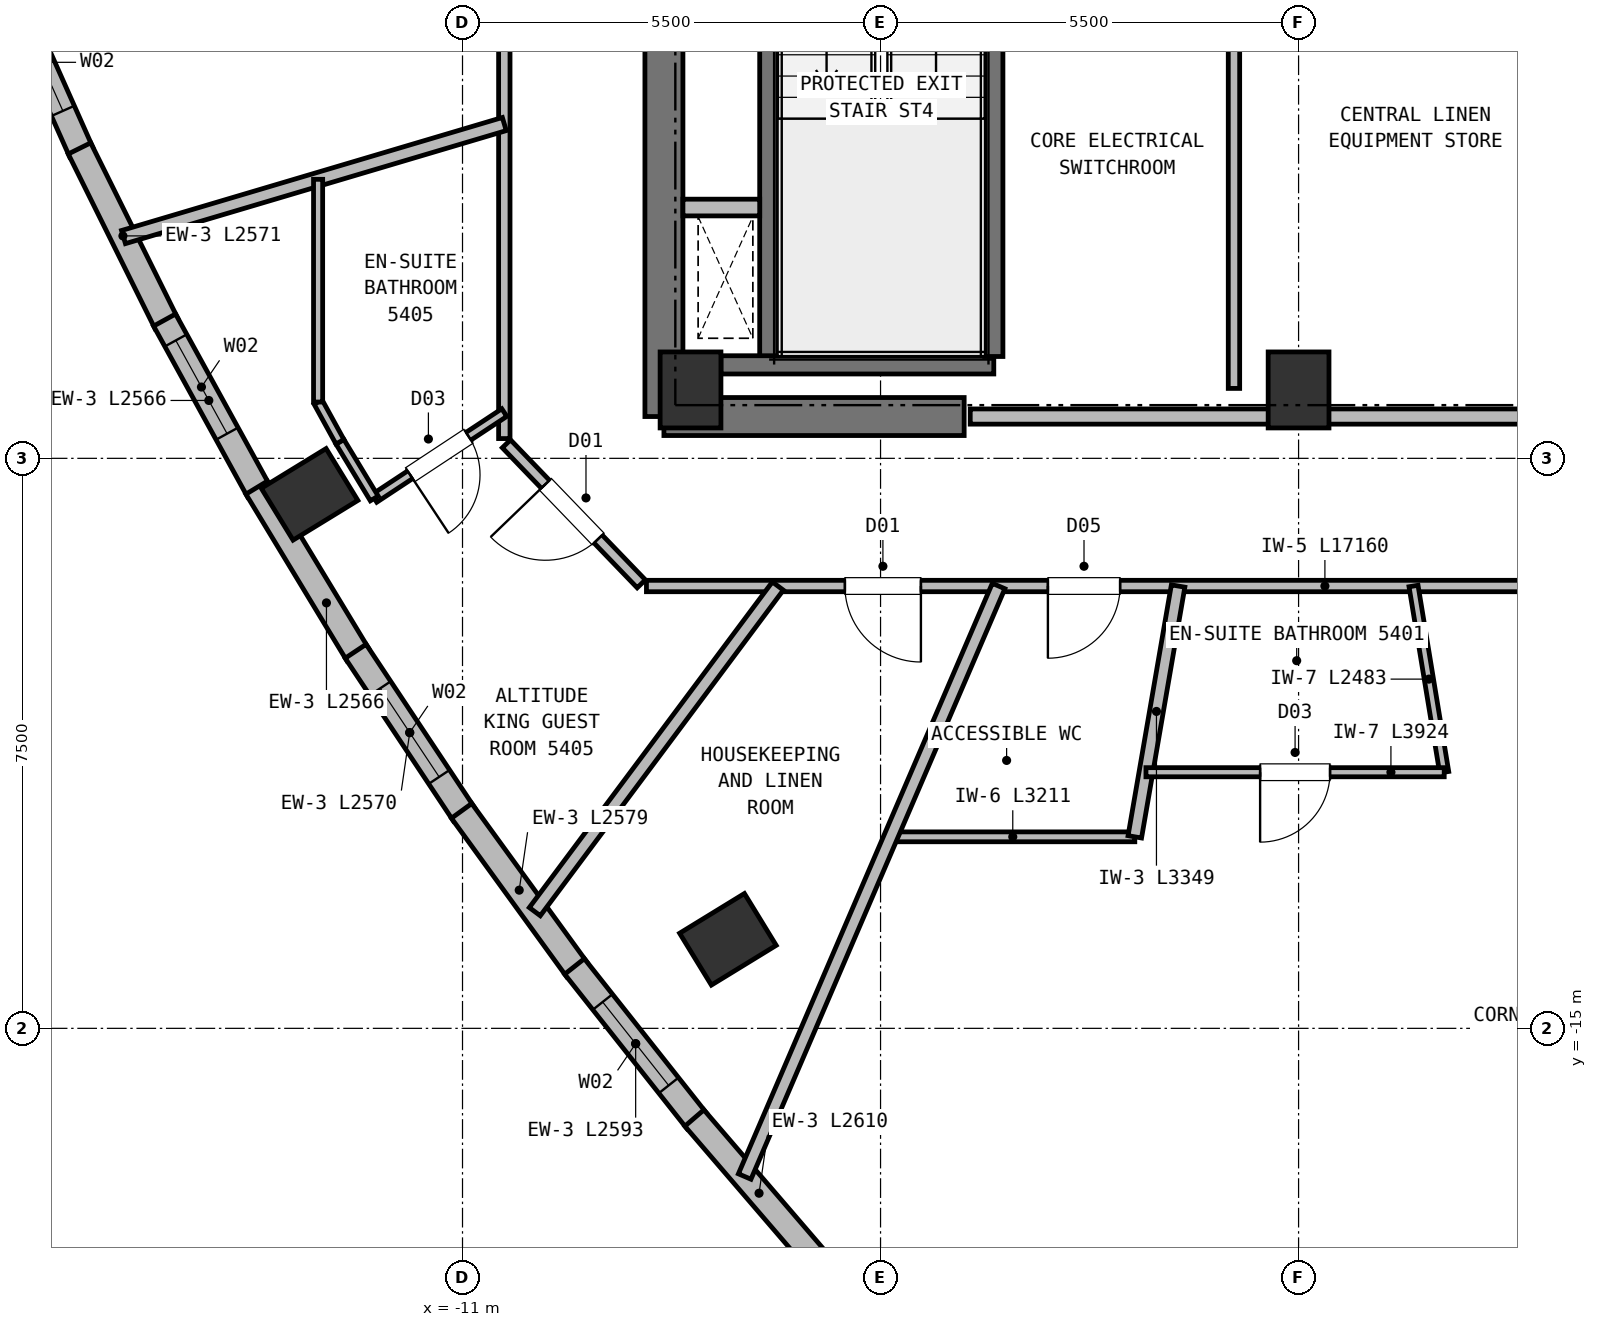
"""IFC4 building model, lengths in metres.
Left out: names, types, materials, properties, quantities, classifications, styles, units other than length and angle.
Written with IfcOpenShell. Run it as: python <this file> out.ifc"""

import sys

from ifc_helpers import new_model, si_unit, direction, frame, frame_2d, origin, origin_2d, place, context, subcontext, project, spatial, rectangle, extrude, element, fill, save


model = new_model("IFC4")
c1 = context("Model", 3, precision=1e-05, world=origin(), true_north=direction((0.0, 1.0)))
c2 = subcontext(c1, "Body", "Model", "MODEL_VIEW")
j1 = project(units=[si_unit("LENGTHUNIT", "METRE"), si_unit("PLANEANGLEUNIT", "RADIAN")], contexts=[c1])
p1 = place(None, origin())
s1 = spatial("IfcSite", under=j1, at=p1, CompositionType="ELEMENT")
p2 = place(p1, origin())
s2 = spatial("IfcBuilding", under=s1, at=p2, CompositionType="ELEMENT")
p3 = place(p2, frame((0.0, 0.0, 205.55)))
s3 = spatial("IfcBuildingStorey", under=s2, at=p3, CompositionType="ELEMENT", Elevation=205.55)
for number, where, z_axis, x_axis in (
    (1, (-8.0, -6.6, 0.0), (0.0, 0.0, 1.0), (1.0, 0.0, 0.0)),
    (2, (0.0, -6.6, 0.0), (0.0, 0.0, 1.0), (1.0, 0.0, 0.0)),
):
    element("IfcColumn", number, at=place(p3, frame(where, z_axis=z_axis, x_axis=x_axis)), inside=s3, PredefinedType="COLUMN", context=c2, shape_type="SweptSolid", body=[
        extrude(rectangle(XDim=0.8, YDim=1.0, at=origin_2d()), origin(), (0.0, 0.0, 1.0), 3.8),
    ])
p4 = place(p3, frame((-8.35, -6.95, 0.0), z_axis=(0.0, 0.0, 1.0), x_axis=(1.0, 0.0, 0.0)))
e3 = element("IfcWall", 3, at=p4, inside=s3, PredefinedType="SHEAR", context=c2, shape_type="SweptSolid", body=[
    extrude(rectangle(XDim=3.95, YDim=0.5, at=frame_2d((1.975, 0.0))), origin(), (0.0, 0.0, 1.0), 3.55),
])
p5 = place(p3, frame((-8.35, -6.95, 0.0), z_axis=(0.0, 0.0, 1.0), x_axis=(0.0, 1.0, 0.0)))
e4 = element("IfcWall", 4, at=p5, inside=s3, PredefinedType="SHEAR", context=c2, shape_type="SweptSolid", body=[
    extrude(rectangle(XDim=8.1, YDim=0.5, at=frame_2d((4.05, 0.0))), origin(), (0.0, 0.0, 1.0), 3.55),
])
for number, where, z_axis, x_axis in (
    (5, (-13.012, -7.974, 0.0), (0.0, 0.0, 1.0), (-0.522, 0.853, 0.0)),
    (6, (-7.508, -13.828, 0.0), (0.0, 0.0, 1.0), (-0.522, 0.853, 0.0)),
):
    element("IfcColumn", number, at=place(p3, frame(where, z_axis=z_axis, x_axis=x_axis)), inside=s3, PredefinedType="COLUMN", context=c2, shape_type="SweptSolid", body=[
        extrude(rectangle(XDim=0.8, YDim=1.0, at=origin_2d()), origin(), (0.0, 0.0, 1.0), 3.8),
    ])
p6 = place(p3, frame((-16.018, -3.467, 0.0), z_axis=(0.0, 0.0, 1.0), x_axis=(-0.40690235828, 0.913471658469, 0.0)))
e7 = element("IfcWall", 7, at=p6, inside=s3, PredefinedType="SOLIDWALL", context=c2, shape_type="SweptSolid", body=[
    extrude(rectangle(XDim=2.579, YDim=0.33, at=frame_2d((1.29, 0.0))), origin(), (0.0, 0.0, 1.0), 3.55),
])
p7 = place(p6, frame((0.59, 0.0, 0.72)))
e8 = element("IfcOpeningElement", 8, at=p7, cuts=e7, PredefinedType="OPENING", context=c2, shape_type="SweptSolid", body=[
    extrude(rectangle(XDim=1.4, YDim=1.84, at=frame_2d((0.7, 0.92))), frame((0.0, 0.175, 0.0), z_axis=(0.0, -1.0, 0.0), x_axis=(1.0, 0.0, 0.0)), (0.0, 0.0, 1.0), 0.35),
])
p8 = place(p3, frame((-14.896, -5.725, 0.0), z_axis=(0.0, 0.0, 1.0), x_axis=(-0.444590292188, 0.895734040936, 0.0)))
e9 = element("IfcWall", 9, at=p8, inside=s3, PredefinedType="SOLIDWALL", context=c2, shape_type="SweptSolid", body=[
    extrude(rectangle(XDim=2.571, YDim=0.33, at=frame_2d((1.285, 0.0))), origin(), (0.0, 0.0, 1.0), 3.55),
])
p9 = place(p3, frame((-13.683, -7.929, 0.0), z_axis=(0.0, 0.0, 1.0), x_axis=(-0.481695948565, 0.87633841245, 0.0)))
e10 = element("IfcWall", 10, at=p9, inside=s3, PredefinedType="SOLIDWALL", context=c2, shape_type="SweptSolid", body=[
    extrude(rectangle(XDim=2.566, YDim=0.33, at=frame_2d((1.283, 0.0))), origin(), (0.0, 0.0, 1.0), 3.55),
])
p10 = place(p9, frame((0.86, 0.0, 0.72)))
e11 = element("IfcOpeningElement", 11, at=p10, cuts=e10, PredefinedType="OPENING", context=c2, shape_type="SweptSolid", body=[
    extrude(rectangle(XDim=1.4, YDim=1.84, at=frame_2d((0.7, 0.92))), frame((0.0, 0.175, 0.0), z_axis=(0.0, -1.0, 0.0), x_axis=(1.0, 0.0, 0.0)), (0.0, 0.0, 1.0), 0.35),
])
p11 = place(p3, frame((-12.379, -10.081, 0.0), z_axis=(0.0, 0.0, 1.0), x_axis=(-0.518128806216, 0.855302601521, 0.0)))
e12 = element("IfcWall", 12, at=p11, inside=s3, PredefinedType="SOLIDWALL", context=c2, shape_type="SweptSolid", body=[
    extrude(rectangle(XDim=2.566, YDim=0.33, at=frame_2d((1.283, 0.0))), origin(), (0.0, 0.0, 1.0), 3.55),
])
p12 = place(p3, frame((-10.983, -12.179, 0.0), z_axis=(0.0, 0.0, 1.0), x_axis=(-0.553340543582, 0.832955126539, 0.0)))
e13 = element("IfcWall", 13, at=p12, inside=s3, PredefinedType="SOLIDWALL", context=c2, shape_type="SweptSolid", body=[
    extrude(rectangle(XDim=2.571, YDim=0.33, at=frame_2d((1.285, 0.0))), origin(), (0.0, 0.0, 1.0), 3.55),
])
p13 = place(p12, frame((0.585, 0.0, 0.72)))
e14 = element("IfcOpeningElement", 14, at=p13, cuts=e13, PredefinedType="OPENING", context=c2, shape_type="SweptSolid", body=[
    extrude(rectangle(XDim=1.4, YDim=1.84, at=frame_2d((0.7, 0.92))), frame((0.0, 0.175, 0.0), z_axis=(0.0, -1.0, 0.0), x_axis=(1.0, 0.0, 0.0)), (0.0, 0.0, 1.0), 0.35),
])
p14 = place(p3, frame((-9.496, -14.225, 0.0), z_axis=(0.0, 0.0, 1.0), x_axis=(-0.587631253471, 0.809128858677, 0.0)))
e15 = element("IfcWall", 15, at=p14, inside=s3, PredefinedType="SOLIDWALL", context=c2, shape_type="SweptSolid", body=[
    extrude(rectangle(XDim=2.579, YDim=0.33, at=frame_2d((1.29, 0.0))), origin(), (0.0, 0.0, 1.0), 3.55),
])
p15 = place(p3, frame((-7.917, -16.219, 0.0), z_axis=(0.0, 0.0, 1.0), x_axis=(-0.62057509915, 0.784147018304, 0.0)))
e16 = element("IfcWall", 16, at=p15, inside=s3, PredefinedType="SOLIDWALL", context=c2, shape_type="SweptSolid", body=[
    extrude(rectangle(XDim=2.593, YDim=0.33, at=frame_2d((1.296, 0.0))), origin(), (0.0, 0.0, 1.0), 3.55),
])
p16 = place(p15, frame((0.596, 0.0, 0.72)))
e17 = element("IfcOpeningElement", 17, at=p16, cuts=e16, PredefinedType="OPENING", context=c2, shape_type="SweptSolid", body=[
    extrude(rectangle(XDim=1.4, YDim=1.84, at=frame_2d((0.7, 0.92))), frame((0.0, 0.175, 0.0), z_axis=(0.0, -1.0, 0.0), x_axis=(1.0, 0.0, 0.0)), (0.0, 0.0, 1.0), 0.35),
])
p17 = place(p3, frame((-6.248, -18.159, 0.0), z_axis=(0.0, 0.0, 1.0), x_axis=(-0.651976891987, 0.758238835932, 0.0)))
e18 = element("IfcWall", 18, at=p17, inside=s3, PredefinedType="SOLIDWALL", context=c2, shape_type="SweptSolid", body=[
    extrude(rectangle(XDim=2.61, YDim=0.33, at=frame_2d((1.305, 0.0))), origin(), (0.0, 0.0, 1.0), 3.55),
])
p18 = place(p3, frame((-6.97, -6.16, 0.0), z_axis=(0.0, 0.0, 1.0), x_axis=(0.0, 1.0, 0.0)))
e19 = element("IfcWall", 19, at=p18, inside=s3, PredefinedType="SHEAR", context=c2, shape_type="SweptSolid", body=[
    extrude(rectangle(XDim=7.22, YDim=0.24, at=frame_2d((3.61, 0.0))), origin(), (0.0, 0.0, 1.0), 3.55),
])
p19 = place(p3, frame((-7.6, -6.27, 0.0), z_axis=(0.0, 0.0, 1.0), x_axis=(1.0, 0.0, 0.0)))
e20 = element("IfcWall", 20, at=p19, inside=s3, PredefinedType="SHEAR", context=c2, shape_type="SweptSolid", body=[
    extrude(rectangle(XDim=3.59, YDim=0.24, at=frame_2d((1.795, 0.0))), origin(), (0.0, 0.0, 1.0), 3.55),
])
p20 = place(p3, frame((-4.01, -6.16, 0.0), z_axis=(0.0, 0.0, 1.0), x_axis=(0.0, 1.0, 0.0)))
e21 = element("IfcWall", 21, at=p20, inside=s3, PredefinedType="SHEAR", context=c2, shape_type="SweptSolid", body=[
    extrude(rectangle(XDim=7.22, YDim=0.24, at=frame_2d((3.61, 0.0))), origin(), (0.0, 0.0, 1.0), 3.55),
])
p21 = place(p3, frame((-8.1, -4.2, 0.0), z_axis=(0.0, 0.0, 1.0), x_axis=(1.0, 0.0, 0.0)))
e22 = element("IfcWall", 22, at=p21, inside=s3, PredefinedType="PARTITIONING", context=c2, shape_type="SweptSolid", body=[
    extrude(rectangle(XDim=1.01, YDim=0.22, at=frame_2d((0.505, 0.0))), origin(), (0.0, 0.0, 1.0), 3.55),
])
p22 = place(p3, frame((-4.32, -6.95, 0.0), z_axis=(0.0, 0.0, 1.0), x_axis=(1.0, 0.0, 0.0)))
e23 = element("IfcWall", 23, at=p22, inside=s3, PredefinedType="PARTITIONING", context=c2, shape_type="SweptSolid", body=[
    extrude(rectangle(XDim=8.64, YDim=0.2, at=frame_2d((4.32, 0.0))), origin(), (0.0, 0.0, 1.0), 3.55),
])
p23 = place(p3, frame((-0.85, -6.58, 0.0), z_axis=(0.0, 0.0, 1.0), x_axis=(0.0, 1.0, 0.0)))
e24 = element("IfcWall", 24, at=p23, inside=s3, PredefinedType="PARTITIONING", context=c2, shape_type="SweptSolid", body=[
    extrude(rectangle(XDim=7.53, YDim=0.15, at=frame_2d((3.765, 0.0))), origin(), (0.0, 0.0, 1.0), 3.55),
])
p24 = place(p3, frame((8.58, -9.18, 0.0), z_axis=(0.0, 0.0, 1.0), x_axis=(-1.0, 0.0, 0.0)))
e25 = element("IfcWall", 25, at=p24, inside=s3, PredefinedType="PARTITIONING", context=c2, shape_type="SweptSolid", body=[
    extrude(rectangle(XDim=17.16, YDim=0.15, at=frame_2d((8.58, 0.0))), origin(), (0.0, 0.0, 1.0), 3.23),
])
p25 = place(p24, frame((10.928, 0.0, 0.0)))
e26 = element("IfcOpeningElement", 26, at=p25, cuts=e25, PredefinedType="OPENING", context=c2, shape_type="SweptSolid", body=[
    extrude(rectangle(XDim=0.95, YDim=2.1, at=frame_2d((0.475, 1.05))), frame((0.0, 0.085, 0.0), z_axis=(0.0, -1.0, 0.0), x_axis=(1.0, 0.0, 0.0)), (0.0, 0.0, 1.0), 0.17),
])
p26 = place(p24, frame((13.549, 0.0, 0.0)))
e27 = element("IfcOpeningElement", 27, at=p26, cuts=e25, PredefinedType="OPENING", context=c2, shape_type="SweptSolid", body=[
    extrude(rectangle(XDim=1.0, YDim=2.15, at=frame_2d((0.5, 1.075))), frame((0.0, 0.085, 0.0), z_axis=(0.0, -1.0, 0.0), x_axis=(1.0, 0.0, 0.0)), (0.0, 0.0, 1.0), 0.17),
])
p27 = place(p24, frame((4.479, 0.0, 0.0)))
e28 = element("IfcOpeningElement", 28, at=p27, cuts=e25, PredefinedType="OPENING", context=c2, shape_type="SweptSolid", body=[
    extrude(rectangle(XDim=1.06, YDim=2.15, at=frame_2d((0.53, 1.075))), frame((0.0, 0.085, 0.0), z_axis=(0.0, -1.0, 0.0), x_axis=(1.0, 0.0, 0.0)), (0.0, 0.0, 1.0), 0.17),
])
p28 = place(p3, frame((-10.45, -7.24, 0.0), z_axis=(0.0, 0.0, 1.0), x_axis=(0.0, 1.0, 0.0)))
e29 = element("IfcWall", 29, at=p28, inside=s3, PredefinedType="PARTITIONING", context=c2, shape_type="SweptSolid", body=[
    extrude(rectangle(XDim=14.48, YDim=0.15, at=frame_2d((7.24, 0.0))), origin(), (0.0, 0.0, 1.0), 3.23),
])
p29 = place(p28, frame((6.669, 0.0, 0.0)))
e30 = element("IfcOpeningElement", 30, at=p29, cuts=e29, PredefinedType="OPENING", context=c2, shape_type="SweptSolid", body=[
    extrude(rectangle(XDim=1.0, YDim=2.15, at=frame_2d((0.5, 1.075))), frame((0.0, 0.085, 0.0), z_axis=(0.0, -1.0, 0.0), x_axis=(1.0, 0.0, 0.0)), (0.0, 0.0, 1.0), 0.17),
])
p30 = place(p28, frame((11.74, 0.0, 0.0)))
e31 = element("IfcOpeningElement", 31, at=p30, cuts=e29, PredefinedType="OPENING", context=c2, shape_type="SweptSolid", body=[
    extrude(rectangle(XDim=1.0, YDim=2.15, at=frame_2d((0.5, 1.075))), frame((0.0, 0.085, 0.0), z_axis=(0.0, -1.0, 0.0), x_axis=(1.0, 0.0, 0.0)), (0.0, 0.0, 1.0), 0.17),
])
p31 = place(p3, frame((-8.648, -9.151, 0.0), z_axis=(0.0, 0.0, 1.0), x_axis=(-0.693764562202, 0.720201869085, 0.0)))
e32 = element("IfcWall", 32, at=p31, inside=s3, PredefinedType="PARTITIONING", context=c2, shape_type="SweptSolid", body=[
    extrude(rectangle(XDim=2.558, YDim=0.15, at=frame_2d((1.279, 0.0))), origin(), (0.0, 0.0, 1.0), 3.23),
])
p32 = place(p31, frame((0.819, 0.0, 0.0)))
e33 = element("IfcOpeningElement", 33, at=p32, cuts=e32, PredefinedType="OPENING", context=c2, shape_type="SweptSolid", body=[
    extrude(rectangle(XDim=1.0, YDim=2.15, at=frame_2d((0.5, 1.075))), frame((0.0, 0.085, 0.0), z_axis=(0.0, -1.0, 0.0), x_axis=(1.0, 0.0, 0.0)), (0.0, 0.0, 1.0), 0.17),
])
p33 = place(p3, frame((-2.155, -12.48, 0.0), z_axis=(0.0, 0.0, 1.0), x_axis=(-1.0, 0.0, 0.0)))
e34 = element("IfcWall", 34, at=p33, inside=s3, PredefinedType="PARTITIONING", context=c2, shape_type="SweptSolid", body=[
    extrude(rectangle(XDim=3.211, YDim=0.13, at=frame_2d((1.605, 0.0))), origin(), (0.0, 0.0, 1.0), 3.55),
])
p34 = place(p3, frame((-1.585, -9.18, 0.0), z_axis=(0.0, 0.0, 1.0), x_axis=(-0.170153481889, -0.985417572708, 0.0)))
e35 = element("IfcWall", 35, at=p34, inside=s3, PredefinedType="PARTITIONING", context=c2, shape_type="SweptSolid", body=[
    extrude(rectangle(XDim=3.349, YDim=0.18, at=frame_2d((1.674, 0.0))), origin(), (0.0, 0.0, 1.0), 3.55),
])
p35 = place(p3, frame((1.916, -11.63, 0.0), z_axis=(0.0, 0.0, 1.0), x_axis=(-0.162628879968, 0.986687309841, 0.0)))
e36 = element("IfcWall", 36, at=p35, inside=s3, PredefinedType="PARTITIONING", context=c2, shape_type="SweptSolid", body=[
    extrude(rectangle(XDim=2.483, YDim=0.12, at=frame_2d((1.241, 0.0))), origin(), (0.0, 0.0, 1.0), 3.55),
])
p36 = place(p3, frame((1.916, -11.63, 0.0), z_axis=(0.0, 0.0, 1.0), x_axis=(-1.0, 0.0, 0.0)))
e37 = element("IfcWall", 37, at=p36, inside=s3, PredefinedType="PARTITIONING", context=c2, shape_type="SweptSolid", body=[
    extrude(rectangle(XDim=3.924, YDim=0.12, at=frame_2d((1.962, 0.0))), origin(), (0.0, 0.0, 1.0), 3.23),
])
p37 = place(p36, frame((1.502, 0.0, 0.0)))
e38 = element("IfcOpeningElement", 38, at=p37, cuts=e37, PredefinedType="OPENING", context=c2, shape_type="SweptSolid", body=[
    extrude(rectangle(XDim=0.92, YDim=2.1, at=frame_2d((0.46, 1.05))), frame((0.0, 0.07, 0.0), z_axis=(0.0, -1.0, 0.0), x_axis=(1.0, 0.0, 0.0)), (0.0, 0.0, 1.0), 0.14),
])
p38 = place(p3, frame((-10.45, -3.102, 0.0), z_axis=(0.0, 0.0, 1.0), x_axis=(-0.958678324952, -0.284492300894, 0.0)))
e39 = element("IfcWall", 39, at=p38, inside=s3, PredefinedType="PARTITIONING", context=c2, shape_type="SweptSolid", body=[
    extrude(rectangle(XDim=5.226, YDim=0.18, at=frame_2d((2.613, 0.0))), origin(), (0.0, 0.0, 1.0), 3.55),
])
p39 = place(p3, frame((-10.45, -6.898, 0.0), z_axis=(0.0, 0.0, 1.0), x_axis=(-0.834551377169, -0.550930121581, 0.0)))
e40 = element("IfcWall", 40, at=p39, inside=s3, PredefinedType="PARTITIONING", context=c2, shape_type="SweptSolid", body=[
    extrude(rectangle(XDim=2.051, YDim=0.12, at=frame_2d((1.025, 0.0))), origin(), (0.0, 0.0, 1.0), 3.55),
])
p40 = place(p39, frame((0.565, 0.0, 0.0)))
e41 = element("IfcOpeningElement", 41, at=p40, cuts=e40, PredefinedType="OPENING", context=c2, shape_type="SweptSolid", body=[
    extrude(rectangle(XDim=0.92, YDim=2.1, at=frame_2d((0.46, 1.05))), frame((0.0, 0.07, 0.0), z_axis=(0.0, -1.0, 0.0), x_axis=(1.0, 0.0, 0.0)), (0.0, 0.0, 1.0), 0.14),
])
p41 = place(p3, frame((-12.613, -7.282, 0.0), z_axis=(0.0, 0.0, 1.0), x_axis=(0.517910571046, -0.855434766887, 0.0)))
e42 = element("IfcWall", 42, at=p41, inside=s3, PredefinedType="PARTITIONING", context=c2, shape_type="SweptSolid", body=[
    extrude(rectangle(XDim=0.872, YDim=0.12, at=frame_2d((0.436, 0.0))), origin(), (0.0, 0.0, 1.0), 3.55),
])
p42 = place(p3, frame((-12.9, -6.759, 0.0), z_axis=(0.0, 0.0, 1.0), x_axis=(0.481745907453, -0.87631094975, 0.0)))
e43 = element("IfcWall", 43, at=p42, inside=s3, PredefinedType="PARTITIONING", context=c2, shape_type="SweptSolid", body=[
    extrude(rectangle(XDim=0.596, YDim=0.12, at=frame_2d((0.298, 0.0))), origin(), (0.0, 0.0, 1.0), 3.55),
])
p43 = place(p3, frame((-12.9, -3.829, 0.0), z_axis=(0.0, 0.0, 1.0), x_axis=(0.0, -1.0, 0.0)))
e44 = element("IfcWall", 44, at=p43, inside=s3, PredefinedType="PARTITIONING", context=c2, shape_type="SweptSolid", body=[
    extrude(rectangle(XDim=2.931, YDim=0.12, at=frame_2d((1.465, 0.0))), origin(), (0.0, 0.0, 1.0), 3.55),
])
p44 = place(p3, frame((-6.851, -9.18, 0.0), z_axis=(0.0, 0.0, 1.0), x_axis=(-0.598105864396, -0.801417104244, 0.0)))
e45 = element("IfcWall", 45, at=p44, inside=s3, PredefinedType="PARTITIONING", context=c2, shape_type="SweptSolid", body=[
    extrude(rectangle(XDim=5.346, YDim=0.18, at=frame_2d((2.673, 0.0))), origin(), (0.0, 0.0, 1.0), 3.55),
])
p45 = place(p3, frame((-3.947, -9.18, 0.0), z_axis=(0.0, 0.0, 1.0), x_axis=(-0.394985116266, -0.918687519197, 0.0)))
e46 = element("IfcWall", 46, at=p45, inside=s3, PredefinedType="PARTITIONING", context=c2, shape_type="SweptSolid", body=[
    extrude(rectangle(XDim=8.458, YDim=0.18, at=frame_2d((4.229, 0.0))), origin(), (0.0, 0.0, 1.0), 3.55),
])
p46 = place(p7, origin())
e47 = element("IfcWindow", 47, at=p46, inside=s3, PartitioningType="SINGLE_PANEL", PredefinedType="WINDOW", context=c2, shape_type="SweptSolid", body=[
    extrude(rectangle(XDim=1.4, YDim=1.84, at=frame_2d((0.7, 0.92))), frame((0.0, 0.03, 0.0), z_axis=(0.0, -1.0, 0.0), x_axis=(1.0, 0.0, 0.0)), (0.0, 0.0, 1.0), 0.06),
])
fill(e8, e47)
p47 = place(p10, origin())
e48 = element("IfcWindow", 48, at=p47, inside=s3, PartitioningType="SINGLE_PANEL", PredefinedType="WINDOW", context=c2, shape_type="SweptSolid", body=[
    extrude(rectangle(XDim=1.4, YDim=1.84, at=frame_2d((0.7, 0.92))), frame((0.0, 0.03, 0.0), z_axis=(0.0, -1.0, 0.0), x_axis=(1.0, 0.0, 0.0)), (0.0, 0.0, 1.0), 0.06),
])
fill(e11, e48)
p48 = place(p13, origin())
e49 = element("IfcWindow", 49, at=p48, inside=s3, PartitioningType="SINGLE_PANEL", PredefinedType="WINDOW", context=c2, shape_type="SweptSolid", body=[
    extrude(rectangle(XDim=1.4, YDim=1.84, at=frame_2d((0.7, 0.92))), frame((0.0, 0.03, 0.0), z_axis=(0.0, -1.0, 0.0), x_axis=(1.0, 0.0, 0.0)), (0.0, 0.0, 1.0), 0.06),
])
fill(e14, e49)
p49 = place(p16, origin())
e50 = element("IfcWindow", 50, at=p49, inside=s3, PartitioningType="SINGLE_PANEL", PredefinedType="WINDOW", context=c2, shape_type="SweptSolid", body=[
    extrude(rectangle(XDim=1.4, YDim=1.84, at=frame_2d((0.7, 0.92))), frame((0.0, 0.03, 0.0), z_axis=(0.0, -1.0, 0.0), x_axis=(1.0, 0.0, 0.0)), (0.0, 0.0, 1.0), 0.06),
])
fill(e17, e50)
p50 = place(p37, origin())
e51 = element("IfcDoor", 51, at=p50, inside=s3, OperationType="SINGLE_SWING_RIGHT", PredefinedType="DOOR", context=c2, shape_type="SweptSolid", body=[
    extrude(rectangle(XDim=0.92, YDim=2.1, at=frame_2d((0.46, 1.05))), frame((0.0, 0.025, 0.0), z_axis=(0.0, -1.0, 0.0), x_axis=(1.0, 0.0, 0.0)), (0.0, 0.0, 1.0), 0.05),
])
fill(e38, e51)
p51 = place(p40, origin())
e52 = element("IfcDoor", 52, at=p51, inside=s3, OperationType="SINGLE_SWING_RIGHT", PredefinedType="DOOR", context=c2, shape_type="SweptSolid", body=[
    extrude(rectangle(XDim=0.92, YDim=2.1, at=frame_2d((0.46, 1.05))), frame((0.0, 0.025, 0.0), z_axis=(0.0, -1.0, 0.0), x_axis=(1.0, 0.0, 0.0)), (0.0, 0.0, 1.0), 0.05),
])
fill(e41, e52)
p52 = place(p25, origin())
e53 = element("IfcDoor", 53, at=p52, inside=s3, OperationType="SINGLE_SWING_RIGHT", PredefinedType="DOOR", context=c2, shape_type="SweptSolid", body=[
    extrude(rectangle(XDim=0.95, YDim=2.1, at=frame_2d((0.475, 1.05))), frame((0.0, 0.025, 0.0), z_axis=(0.0, -1.0, 0.0), x_axis=(1.0, 0.0, 0.0)), (0.0, 0.0, 1.0), 0.05),
])
fill(e26, e53)
p53 = place(p26, origin())
e54 = element("IfcDoor", 54, at=p53, inside=s3, OperationType="SINGLE_SWING_LEFT", PredefinedType="DOOR", context=c2, shape_type="SweptSolid", body=[
    extrude(rectangle(XDim=1.0, YDim=2.15, at=frame_2d((0.5, 1.075))), frame((0.0, 0.025, 0.0), z_axis=(0.0, -1.0, 0.0), x_axis=(1.0, 0.0, 0.0)), (0.0, 0.0, 1.0), 0.05),
])
fill(e27, e54)
p54 = place(p32, origin())
e55 = element("IfcDoor", 55, at=p54, inside=s3, OperationType="SINGLE_SWING_RIGHT", PredefinedType="DOOR", context=c2, shape_type="SweptSolid", body=[
    extrude(rectangle(XDim=1.0, YDim=2.15, at=frame_2d((0.5, 1.075))), frame((0.0, 0.025, 0.0), z_axis=(0.0, -1.0, 0.0), x_axis=(1.0, 0.0, 0.0)), (0.0, 0.0, 1.0), 0.05),
])
fill(e33, e55)
save(model, sys.argv[1])
